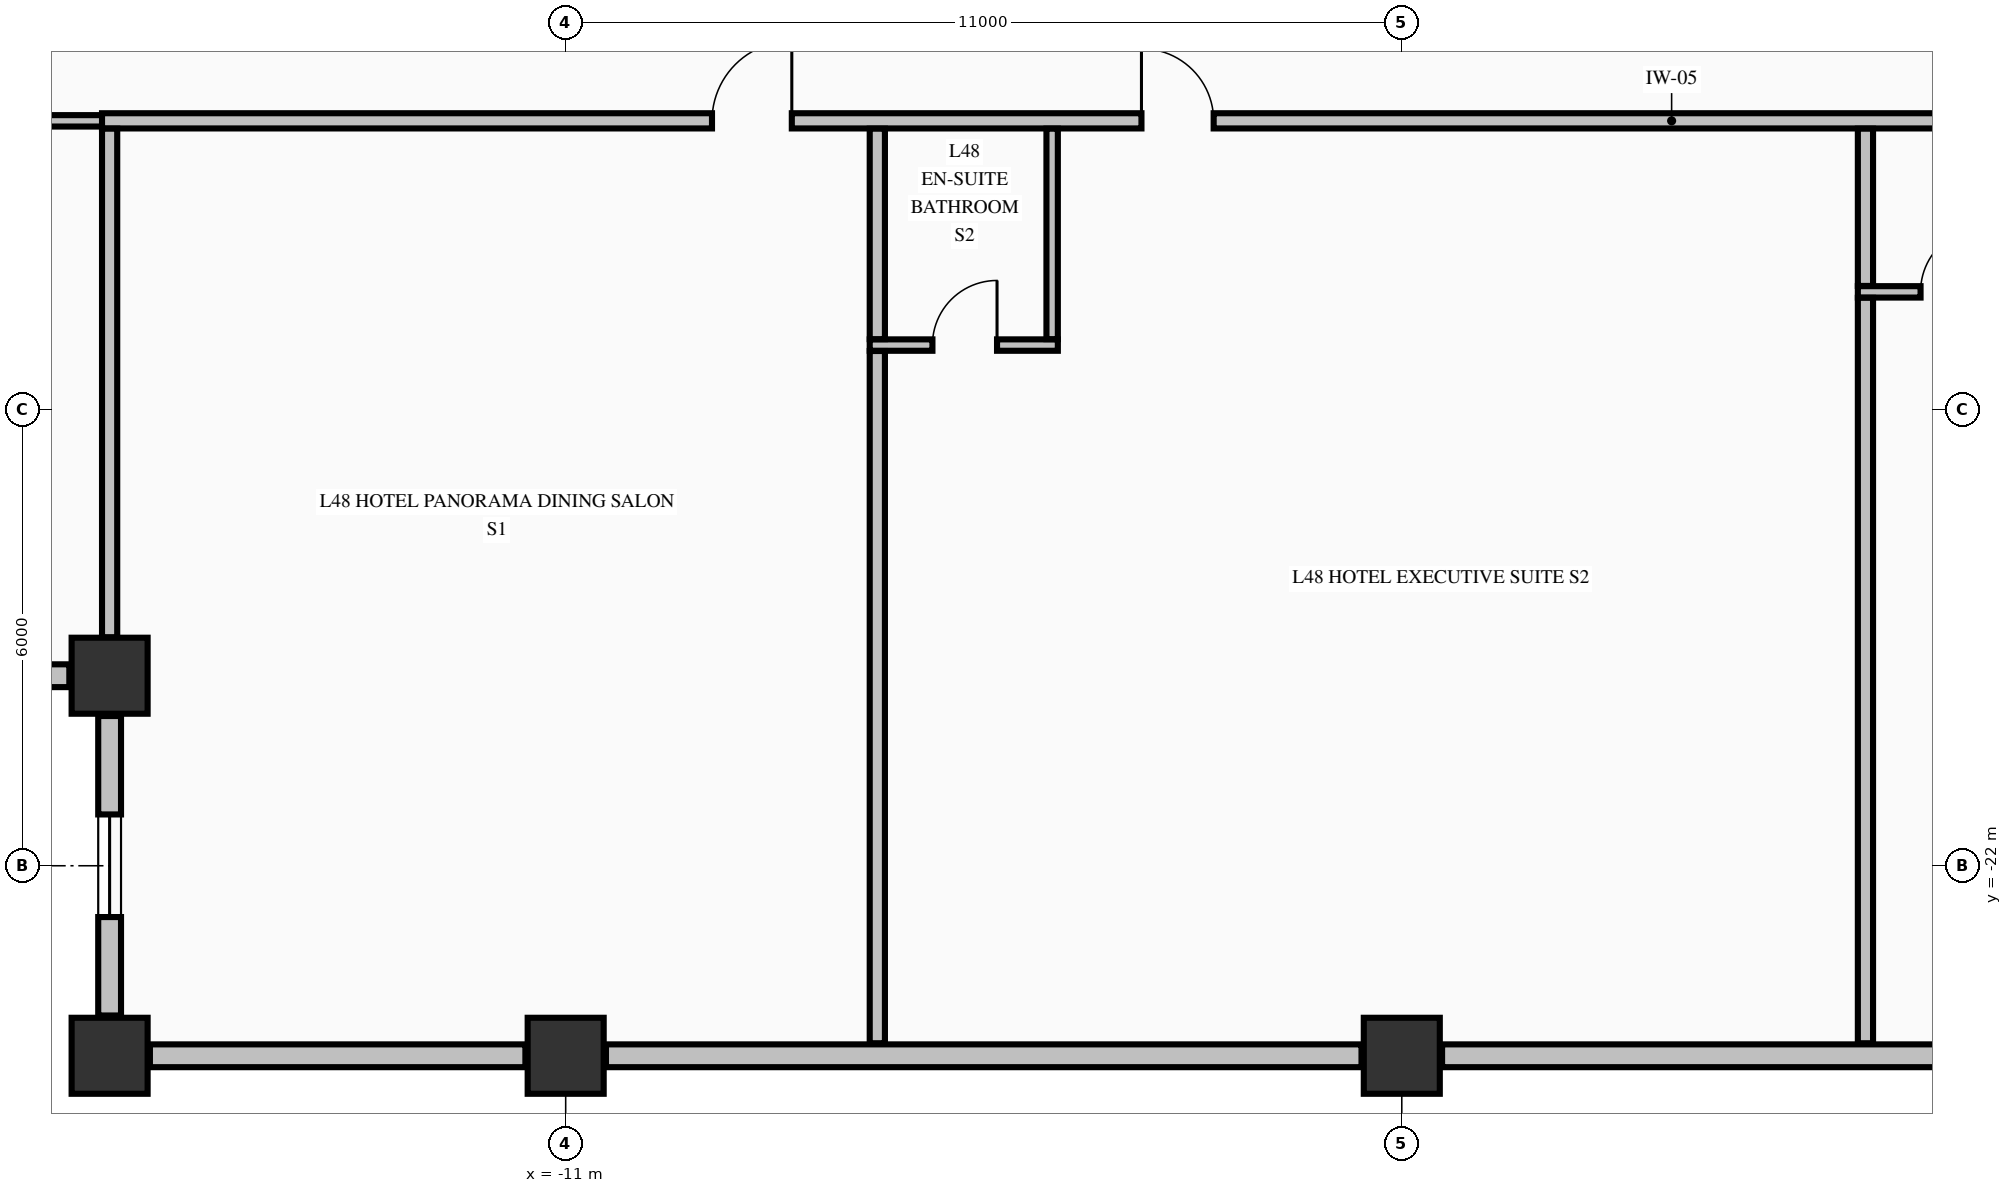
"""IFC4 building model, lengths in metres.
Left out: names, types, materials, properties, quantities, classifications, styles, units other than length and angle.
Written with IfcOpenShell. Run it as: python <this file> out.ifc"""

import sys

from ifc_helpers import new_model, si_unit, direction, frame, frame_2d, origin, origin_2d, place, context, subcontext, project, spatial, rectangle, extrude, element, fill, save


model = new_model("IFC4")
c1 = context("Model", 3, precision=1e-05, world=origin(), true_north=direction((0.0, 1.0)))
c2 = subcontext(c1, "Body", "Model", "MODEL_VIEW")
j1 = project(units=[si_unit("LENGTHUNIT", "METRE"), si_unit("PLANEANGLEUNIT", "RADIAN")], contexts=[c1])
p1 = place(None, origin())
s1 = spatial("IfcSite", under=j1, at=p1, CompositionType="ELEMENT")
p2 = place(p1, origin())
s2 = spatial("IfcBuilding", under=s1, at=p2, CompositionType="ELEMENT")
p3 = place(p2, frame((0.0, 0.0, 186.46)))
s3 = spatial("IfcBuildingStorey", under=s2, at=p3, CompositionType="ELEMENT", Elevation=186.46)
for number, where, z_axis, x_axis in (
    (1, (-17.0, -24.5, -0.425), (0.0, 0.0, 1.0), (1.0, 0.0, 0.0)),
    (2, (-11.0, -24.5, -0.425), (0.0, 0.0, 1.0), (1.0, 0.0, 0.0)),
    (3, (0.0, -24.5, -0.425), (0.0, 0.0, 1.0), (1.0, 0.0, 0.0)),
    (4, (-17.0, -19.5, -0.425), (0.0, 0.0, 1.0), (1.0, 0.0, 0.0)),
):
    element("IfcColumn", number, at=place(p3, frame(where, z_axis=z_axis, x_axis=x_axis)), inside=s3, PredefinedType="COLUMN", context=c2, shape_type="SweptSolid", body=[
        extrude(rectangle(XDim=1.0, YDim=1.0, at=origin_2d()), origin(), (0.0, 0.0, 1.0), 5.0),
    ])
p4 = place(p3, frame((-21.47, -19.5, 0.0), z_axis=(0.0, 0.0, 1.0), x_axis=(1.0, 0.0, 0.0)))
e5 = element("IfcWall", 5, at=p4, inside=s3, PredefinedType="STANDARD", context=c2, shape_type="SweptSolid", body=[
    extrude(rectangle(XDim=3.94, YDim=0.3, at=frame_2d((1.97, 0.0))), origin(), (0.0, 0.0, 1.0), 2.167),
])
p5 = place(p3, frame((-17.0, -20.03, 0.0), z_axis=(0.0, 0.0, 1.0), x_axis=(0.0, -1.0, 0.0)))
e6 = element("IfcWall", 6, at=p5, inside=s3, PredefinedType="STANDARD", context=c2, shape_type="SweptSolid", body=[
    extrude(rectangle(XDim=3.94, YDim=0.3, at=frame_2d((1.97, 0.0))), origin(), (0.0, 0.0, 1.0), 2.767),
])
p6 = place(p5, frame((1.295, 0.0, 0.68)))
e7 = element("IfcOpeningElement", 7, at=p6, cuts=e6, PredefinedType="OPENING", context=c2, shape_type="SweptSolid", body=[
    extrude(rectangle(XDim=1.35, YDim=1.42, at=frame_2d((0.675, 0.71))), frame((0.0, 0.16, 0.0), z_axis=(0.0, -1.0, 0.0), x_axis=(1.0, 0.0, 0.0)), (0.0, 0.0, 1.0), 0.32),
])
p7 = place(p3, frame((-16.47, -24.5, 0.0), z_axis=(0.0, 0.0, 1.0), x_axis=(1.0, 0.0, 0.0)))
e8 = element("IfcWall", 8, at=p7, inside=s3, PredefinedType="STANDARD", context=c2, shape_type="SweptSolid", body=[
    extrude(rectangle(XDim=4.94, YDim=0.3, at=frame_2d((2.47, 0.0))), origin(), (0.0, 0.0, 1.0), 2.167),
])
for number, where, z_axis, x_axis in (
    (9, (-10.47, -24.5, 0.0), (0.0, 0.0, 1.0), (1.0, 0.0, 0.0)),
    (10, (0.53, -24.5, 0.0), (0.0, 0.0, 1.0), (1.0, 0.0, 0.0)),
):
    element("IfcWall", number, at=place(p3, frame(where, z_axis=z_axis, x_axis=x_axis)), inside=s3, PredefinedType="STANDARD", context=c2, shape_type="SweptSolid", body=[
        extrude(rectangle(XDim=9.94, YDim=0.3, at=frame_2d((4.97, 0.0))), origin(), (0.0, 0.0, 1.0), 2.167),
    ])
p8 = place(p3, frame((-7.0, -15.15, 0.0), z_axis=(0.0, 0.0, 1.0), x_axis=(1.0, 0.0, 0.0)))
e11 = element("IfcWall", 11, at=p8, inside=s3, PredefinedType="PARTITIONING", context=c2, shape_type="SweptSolid", body=[
    extrude(rectangle(XDim=2.475, YDim=0.15, at=frame_2d((1.238, 0.0))), origin(), (0.0, 0.0, 1.0), 4.575),
])
p9 = place(p8, frame((0.825, 0.0, 0.0)))
e12 = element("IfcOpeningElement", 12, at=p9, cuts=e11, PredefinedType="OPENING", context=c2, shape_type="SweptSolid", body=[
    extrude(rectangle(XDim=0.85, YDim=2.1, at=frame_2d((0.425, 1.05))), frame((0.0, 0.085, 0.0), z_axis=(0.0, -1.0, 0.0), x_axis=(1.0, 0.0, 0.0)), (0.0, 0.0, 1.0), 0.17),
])
p10 = place(p3, frame((6.0, -14.45, 0.0), z_axis=(0.0, 0.0, 1.0), x_axis=(1.0, 0.0, 0.0)))
e13 = element("IfcWall", 13, at=p10, inside=s3, PredefinedType="PARTITIONING", context=c2, shape_type="SweptSolid", body=[
    extrude(rectangle(XDim=2.475, YDim=0.15, at=frame_2d((1.238, 0.0))), origin(), (0.0, 0.0, 1.0), 4.115),
])
p11 = place(p10, frame((0.825, 0.0, 0.0)))
e14 = element("IfcOpeningElement", 14, at=p11, cuts=e13, PredefinedType="OPENING", context=c2, shape_type="SweptSolid", body=[
    extrude(rectangle(XDim=0.85, YDim=2.1, at=frame_2d((0.425, 1.05))), frame((0.0, 0.085, 0.0), z_axis=(0.0, -1.0, 0.0), x_axis=(1.0, 0.0, 0.0)), (0.0, 0.0, 1.0), 0.17),
])
p12 = place(p3, frame((-20.075, -12.2, 0.0), z_axis=(0.0, 0.0, 1.0), x_axis=(1.0, 0.0, 0.0)))
e15 = element("IfcWall", 15, at=p12, inside=s3, PredefinedType="PARTITIONING", context=c2, shape_type="SweptSolid", body=[
    extrude(rectangle(XDim=3.175, YDim=0.15, at=frame_2d((1.587, 0.0))), origin(), (0.0, 0.0, 1.0), 4.575),
])
p13 = place(p3, frame((-17.1, -12.2, 0.0), z_axis=(0.0, 0.0, 1.0), x_axis=(1.0, 0.0, 0.0)))
e16 = element("IfcWall", 16, at=p13, inside=s3, PredefinedType="PARTITIONING", context=c2, shape_type="SweptSolid", body=[
    extrude(rectangle(XDim=39.2, YDim=0.2, at=frame_2d((19.6, 0.0))), origin(), (0.0, 0.0, 1.0), 4.575),
])
p14 = place(p13, frame((8.025, 0.0, 0.0)))
e17 = element("IfcOpeningElement", 17, at=p14, cuts=e16, PredefinedType="OPENING", context=c2, shape_type="SweptSolid", body=[
    extrude(rectangle(XDim=1.05, YDim=2.15, at=frame_2d((0.525, 1.075))), frame((0.0, 0.11, 0.0), z_axis=(0.0, -1.0, 0.0), x_axis=(1.0, 0.0, 0.0)), (0.0, 0.0, 1.0), 0.22),
])
p15 = place(p13, frame((13.675, 0.0, 0.0)))
e18 = element("IfcOpeningElement", 18, at=p15, cuts=e16, PredefinedType="OPENING", context=c2, shape_type="SweptSolid", body=[
    extrude(rectangle(XDim=0.95, YDim=2.15, at=frame_2d((0.475, 1.075))), frame((0.0, 0.11, 0.0), z_axis=(0.0, -1.0, 0.0), x_axis=(1.0, 0.0, 0.0)), (0.0, 0.0, 1.0), 0.22),
])
p16 = place(p13, frame((26.675, 0.0, 0.0)))
e19 = element("IfcOpeningElement", 19, at=p16, cuts=e16, PredefinedType="OPENING", context=c2, shape_type="SweptSolid", body=[
    extrude(rectangle(XDim=0.95, YDim=2.02, at=frame_2d((0.475, 1.01))), frame((0.0, 0.11, 0.0), z_axis=(0.0, -1.0, 0.0), x_axis=(1.0, 0.0, 0.0)), (0.0, 0.0, 1.0), 0.22),
])
p17 = place(p13, frame((34.705, 0.0, 0.0)))
e20 = element("IfcOpeningElement", 20, at=p17, cuts=e16, PredefinedType="OPENING", context=c2, shape_type="SweptSolid", body=[
    extrude(rectangle(XDim=0.95, YDim=2.15, at=frame_2d((0.475, 1.075))), frame((0.0, 0.11, 0.0), z_axis=(0.0, -1.0, 0.0), x_axis=(1.0, 0.0, 0.0)), (0.0, 0.0, 1.0), 0.22),
])
p18 = place(p3, frame((-17.0, -18.994, 0.0), z_axis=(0.0, 0.0, 1.0), x_axis=(0.0, 1.0, 0.0)))
e21 = element("IfcWall", 21, at=p18, inside=s3, PredefinedType="PARTITIONING", context=c2, shape_type="SweptSolid", body=[
    extrude(rectangle(XDim=6.691, YDim=0.2, at=frame_2d((3.345, 0.0))), origin(), (0.0, 0.0, 1.0), 4.575),
])
p19 = place(p3, frame((-6.9, -24.335, 0.0), z_axis=(0.0, 0.0, 1.0), x_axis=(0.0, 1.0, 0.0)))
e22 = element("IfcWall", 22, at=p19, inside=s3, PredefinedType="PARTITIONING", context=c2, shape_type="SweptSolid", body=[
    extrude(rectangle(XDim=9.107, YDim=0.2, at=frame_2d((4.553, 0.0))), origin(), (0.0, 0.0, 1.0), 4.575),
])
p20 = place(p3, frame((-6.9, -15.072, 0.0), z_axis=(0.0, 0.0, 1.0), x_axis=(0.0, 1.0, 0.0)))
e23 = element("IfcWall", 23, at=p20, inside=s3, PredefinedType="PARTITIONING", context=c2, shape_type="SweptSolid", body=[
    extrude(rectangle(XDim=2.769, YDim=0.2, at=frame_2d((1.385, 0.0))), origin(), (0.0, 0.0, 1.0), 4.575),
])
p21 = place(p3, frame((-4.6, -15.072, 0.0), z_axis=(0.0, 0.0, 1.0), x_axis=(0.0, 1.0, 0.0)))
e24 = element("IfcWall", 24, at=p21, inside=s3, PredefinedType="PARTITIONING", context=c2, shape_type="SweptSolid", body=[
    extrude(rectangle(XDim=2.769, YDim=0.15, at=frame_2d((1.385, 0.0))), origin(), (0.0, 0.0, 1.0), 4.575),
])
p22 = place(p3, frame((6.1, -24.335, 0.0), z_axis=(0.0, 0.0, 1.0), x_axis=(0.0, 1.0, 0.0)))
e25 = element("IfcWall", 25, at=p22, inside=s3, PredefinedType="PARTITIONING", context=c2, shape_type="SweptSolid", body=[
    extrude(rectangle(XDim=9.807, YDim=0.2, at=frame_2d((4.903, 0.0))), origin(), (0.0, 0.0, 1.0), 4.575),
])
p23 = place(p3, frame((6.1, -14.372, 0.0), z_axis=(0.0, 0.0, 1.0), x_axis=(0.0, 1.0, 0.0)))
e26 = element("IfcWall", 26, at=p23, inside=s3, PredefinedType="PARTITIONING", context=c2, shape_type="SweptSolid", body=[
    extrude(rectangle(XDim=2.069, YDim=0.2, at=frame_2d((1.035, 0.0))), origin(), (0.0, 0.0, 1.0), 4.575),
])
p24 = place(p6, origin())
e27 = element("IfcWindow", 27, at=p24, inside=s3, PartitioningType="SINGLE_PANEL", PredefinedType="WINDOW", context=c2, shape_type="SweptSolid", body=[
    extrude(rectangle(XDim=1.35, YDim=1.42, at=frame_2d((0.675, 0.71))), frame((0.0, 0.03, 0.0), z_axis=(0.0, -1.0, 0.0), x_axis=(1.0, 0.0, 0.0)), (0.0, 0.0, 1.0), 0.06),
])
fill(e7, e27)
p25 = place(p14, origin())
e28 = element("IfcDoor", 28, at=p25, inside=s3, OperationType="SINGLE_SWING_RIGHT", PredefinedType="DOOR", context=c2, shape_type="SweptSolid", body=[
    extrude(rectangle(XDim=1.05, YDim=2.15, at=frame_2d((0.525, 1.075))), frame((0.0, 0.025, 0.0), z_axis=(0.0, -1.0, 0.0), x_axis=(1.0, 0.0, 0.0)), (0.0, 0.0, 1.0), 0.05),
])
fill(e17, e28)
p26 = place(p15, origin())
e29 = element("IfcDoor", 29, at=p26, inside=s3, OperationType="SINGLE_SWING_LEFT", PredefinedType="DOOR", context=c2, shape_type="SweptSolid", body=[
    extrude(rectangle(XDim=0.95, YDim=2.15, at=frame_2d((0.475, 1.075))), frame((0.0, 0.025, 0.0), z_axis=(0.0, -1.0, 0.0), x_axis=(1.0, 0.0, 0.0)), (0.0, 0.0, 1.0), 0.05),
])
fill(e18, e29)
p27 = place(p9, origin())
e30 = element("IfcDoor", 30, at=p27, inside=s3, OperationType="SINGLE_SWING_RIGHT", PredefinedType="DOOR", context=c2, shape_type="SweptSolid", body=[
    extrude(rectangle(XDim=0.85, YDim=2.1, at=frame_2d((0.425, 1.05))), frame((0.0, 0.025, 0.0), z_axis=(0.0, -1.0, 0.0), x_axis=(1.0, 0.0, 0.0)), (0.0, 0.0, 1.0), 0.05),
])
fill(e12, e30)
p28 = place(p11, origin())
e31 = element("IfcDoor", 31, at=p28, inside=s3, OperationType="SINGLE_SWING_RIGHT", PredefinedType="DOOR", context=c2, shape_type="SweptSolid", body=[
    extrude(rectangle(XDim=0.85, YDim=2.1, at=frame_2d((0.425, 1.05))), frame((0.0, 0.025, 0.0), z_axis=(0.0, -1.0, 0.0), x_axis=(1.0, 0.0, 0.0)), (0.0, 0.0, 1.0), 0.05),
])
fill(e14, e31)
save(model, sys.argv[1])
